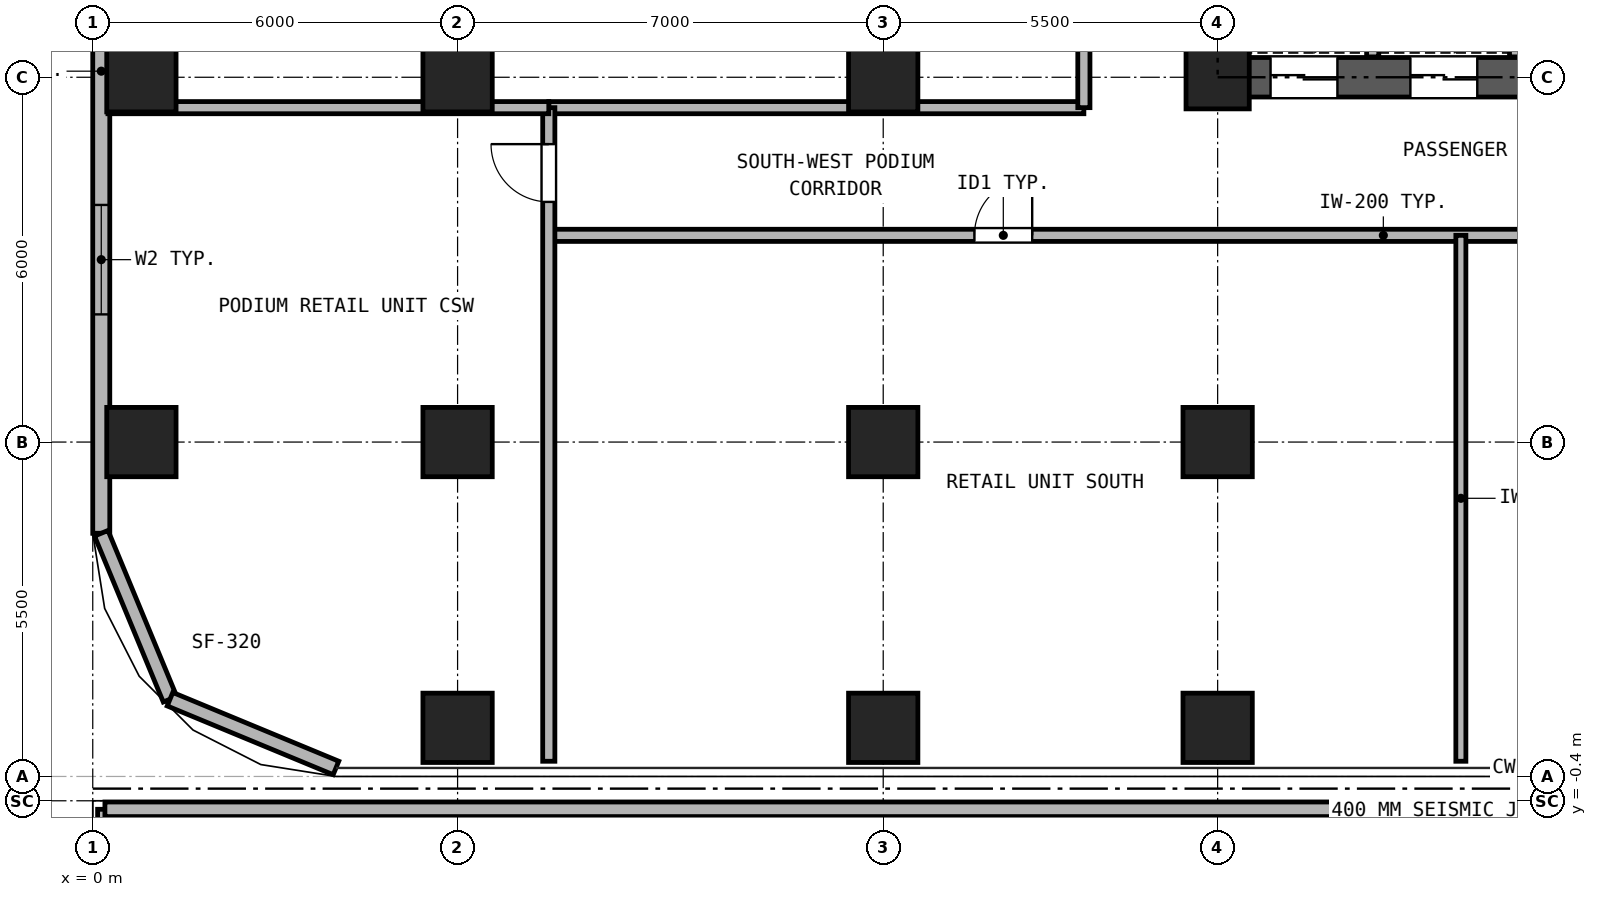
"""IFC4 building model, lengths in metres.
Left out: names, types, materials, properties, quantities, classifications, styles, units other than length and angle.
Written with IfcOpenShell. Run it as: python <this file> out.ifc"""

import sys

from ifc_helpers import new_model, si_unit, direction, frame, frame_2d, origin, origin_2d, place, context, subcontext, project, spatial, rectangle, hollow_rectangle, extrude, source, transform, mapped, element, fill, save


model = new_model("IFC4")
c1 = context("Model", 3, precision=1e-05, world=origin(), true_north=direction((0.0, 1.0)))
c2 = subcontext(c1, "Body", "Model", "MODEL_VIEW")
j1 = project(units=[si_unit("LENGTHUNIT", "METRE"), si_unit("PLANEANGLEUNIT", "RADIAN")], contexts=[c1])
p1 = place(None, origin())
s1 = spatial("IfcSite", under=j1, at=p1, CompositionType="ELEMENT")
p2 = place(p1, origin())
s2 = spatial("IfcBuilding", under=s1, at=p2, CompositionType="ELEMENT")
p3 = place(p2, frame((0.0, 0.0, 9.0)))
s3 = spatial("IfcBuildingStorey", under=s2, at=p3, CompositionType="ELEMENT", Elevation=9.0)
m1 = source(origin(), c2, "Body", "SweptSolid", [
    extrude(hollow_rectangle(XDim=1.14, YDim=1.14, WallThickness=0.07, at=origin_2d()), origin(), (0.0, 0.0, 1.0), 4.18),
])
for number, where, z_axis, x_axis in (
    (1, (6.0, 0.8, 0.0), (0.0, 0.0, 1.0), (1.0, 0.0, 0.0)),
    (2, (13.0, 0.8, 0.0), (0.0, 0.0, 1.0), (1.0, 0.0, 0.0)),
    (3, (18.5, 0.8, 0.0), (0.0, 0.0, 1.0), (1.0, 0.0, 0.0)),
    (4, (0.8, 5.5, 0.0), (0.0, 0.0, 1.0), (1.0, 0.0, 0.0)),
    (5, (0.8, 11.5, 0.0), (0.0, 0.0, 1.0), (1.0, 0.0, 0.0)),
    (6, (6.0, 5.5, 0.0), (0.0, 0.0, 1.0), (1.0, 0.0, 0.0)),
    (7, (6.0, 11.5, 0.0), (0.0, 0.0, 1.0), (1.0, 0.0, 0.0)),
    (8, (13.0, 5.5, 0.0), (0.0, 0.0, 1.0), (1.0, 0.0, 0.0)),
    (9, (13.0, 11.5, 0.0), (0.0, 0.0, 1.0), (1.0, 0.0, 0.0)),
    (10, (18.5, 5.5, 0.0), (0.0, 0.0, 1.0), (1.0, 0.0, 0.0)),
):
    element("IfcColumn", number, at=place(p3, frame(where, z_axis=z_axis, x_axis=x_axis)), inside=s3, PredefinedType="COLUMN", context=c2, shape_type="MappedRepresentation", body=[
        mapped(m1, transform((0.0, 0.0, 0.0), x_axis=(1.0, 0.0, 0.0), y_axis=(0.0, 1.0, 0.0), z_axis=(0.0, 0.0, 1.0), scale=1.0)),
    ])
m2 = source(origin(), c2, "Body", "SweptSolid", [
    extrude(hollow_rectangle(XDim=1.04, YDim=1.04, WallThickness=0.065, at=origin_2d()), origin(), (0.0, 0.0, 1.0), 4.18),
])
p4 = place(p3, frame((18.5, 11.5, 0.0), z_axis=(0.0, 0.0, 1.0), x_axis=(1.0, 0.0, 0.0)))
e11 = element("IfcColumn", 11, at=p4, inside=s3, PredefinedType="COLUMN", context=c2, shape_type="MappedRepresentation", body=[
    mapped(m2, transform((0.0, 0.0, 0.0), x_axis=(1.0, 0.0, 0.0), y_axis=(0.0, 1.0, 0.0), z_axis=(0.0, 0.0, 1.0), scale=1.0)),
])
p5 = place(p3, frame((0.14, 4.0, 0.0), z_axis=(0.0, 0.0, 1.0), x_axis=(0.0, 1.0, 0.0)))
e12 = element("IfcWall", 12, at=p5, inside=s3, PredefinedType="SOLIDWALL", context=c2, shape_type="SweptSolid", body=[
    extrude(rectangle(XDim=32.5, YDim=0.28, at=frame_2d((16.25, 0.0))), origin(), (0.0, 0.0, 1.0), 4.18),
])
p6 = place(p5, frame((3.6, 0.0, 0.9)))
e13 = element("IfcOpeningElement", 13, at=p6, cuts=e12, PredefinedType="OPENING", context=c2, shape_type="SweptSolid", body=[
    extrude(rectangle(XDim=1.8, YDim=2.1, at=frame_2d((0.9, 1.05))), frame((0.0, 0.15, 0.0), z_axis=(0.0, -1.0, 0.0), x_axis=(1.0, 0.0, 0.0)), (0.0, 0.0, 1.0), 0.3),
])
p7 = place(p5, frame((9.8, 0.0, 0.9)))
e14 = element("IfcOpeningElement", 14, at=p7, cuts=e12, PredefinedType="OPENING", context=c2, shape_type="SweptSolid", body=[
    extrude(rectangle(XDim=1.8, YDim=2.1, at=frame_2d((0.9, 1.05))), frame((0.0, 0.15, 0.0), z_axis=(0.0, -1.0, 0.0), x_axis=(1.0, 0.0, 0.0)), (0.0, 0.0, 1.0), 0.3),
])
p8 = place(p5, frame((15.8, 0.0, 0.9)))
e15 = element("IfcOpeningElement", 15, at=p8, cuts=e12, PredefinedType="OPENING", context=c2, shape_type="SweptSolid", body=[
    extrude(rectangle(XDim=1.8, YDim=2.1, at=frame_2d((0.9, 1.05))), frame((0.0, 0.15, 0.0), z_axis=(0.0, -1.0, 0.0), x_axis=(1.0, 0.0, 0.0)), (0.0, 0.0, 1.0), 0.3),
])
p9 = place(p5, frame((21.6, 0.0, 0.9)))
e16 = element("IfcOpeningElement", 16, at=p9, cuts=e12, PredefinedType="OPENING", context=c2, shape_type="SweptSolid", body=[
    extrude(rectangle(XDim=1.8, YDim=2.1, at=frame_2d((0.9, 1.05))), frame((0.0, 0.15, 0.0), z_axis=(0.0, -1.0, 0.0), x_axis=(1.0, 0.0, 0.0)), (0.0, 0.0, 1.0), 0.3),
])
p10 = place(p5, frame((27.6, 0.0, 0.9)))
e17 = element("IfcOpeningElement", 17, at=p10, cuts=e12, PredefinedType="OPENING", context=c2, shape_type="SweptSolid", body=[
    extrude(rectangle(XDim=1.8, YDim=2.1, at=frame_2d((0.9, 1.05))), frame((0.0, 0.15, 0.0), z_axis=(0.0, -1.0, 0.0), x_axis=(1.0, 0.0, 0.0)), (0.0, 0.0, 1.0), 0.3),
])
for number, where, z_axis, x_axis in (
    (18, (0.14, 4.0, 0.0), (0.0, 0.0, 1.0), (0.383, -0.924, 0.0)),
    (19, (1.271, 1.271, 0.0), (0.0, 0.0, 1.0), (0.924, -0.383, 0.0)),
):
    element("IfcWall", number, at=place(p3, frame(where, z_axis=z_axis, x_axis=x_axis)), inside=s3, PredefinedType="SOLIDWALL", context=c2, shape_type="SweptSolid", body=[
        extrude(rectangle(XDim=2.954, YDim=0.24, at=frame_2d((1.477, 0.0))), origin(), (0.0, 0.0, 1.0), 4.18),
    ])
p11 = place(p3, frame((0.2, -10.95, 0.0), z_axis=(0.0, 0.0, 1.0), x_axis=(0.0, 1.0, 0.0)))
e20 = element("IfcWall", 20, at=p11, inside=s3, PredefinedType="SOLIDWALL", context=c2, shape_type="SweptSolid", body=[
    extrude(rectangle(XDim=10.41, YDim=0.24, at=frame_2d((5.205, 0.0))), origin(), (0.0, 0.0, 1.0), 4.18),
])
p12 = place(p3, frame((0.2, -0.54, 0.0), z_axis=(0.0, 0.0, 1.0), x_axis=(1.0, 0.0, 0.0)))
e21 = element("IfcWall", 21, at=p12, inside=s3, PredefinedType="SOLIDWALL", context=c2, shape_type="SweptSolid", body=[
    extrude(rectangle(XDim=47.34, YDim=0.24, at=frame_2d((23.67, 0.0))), origin(), (0.0, 0.0, 1.0), 4.18),
])
p13 = place(p3, frame((18.175, 11.5, 0.0), z_axis=(0.0, 0.0, 1.0), x_axis=(1.0, 0.0, 0.0)))
e22 = element("IfcWall", 22, at=p13, inside=s3, PredefinedType="SHEAR", context=c2, shape_type="SweptSolid", body=[
    extrude(rectangle(XDim=10.65, YDim=0.65, at=frame_2d((5.325, 0.0))), origin(), (0.0, 0.0, 1.0), 4.18),
])
p14 = place(p13, frame((1.195, 0.0, 0.0)))
e23 = element("IfcOpeningElement", 23, at=p14, cuts=e22, PredefinedType="OPENING", context=c2, shape_type="SweptSolid", body=[
    extrude(rectangle(XDim=1.1, YDim=2.25, at=frame_2d((0.55, 1.125))), frame((0.0, 0.335, 0.0), z_axis=(0.0, -1.0, 0.0), x_axis=(1.0, 0.0, 0.0)), (0.0, 0.0, 1.0), 0.67),
])
p15 = place(p13, frame((3.495, 0.0, 0.0)))
e24 = element("IfcOpeningElement", 24, at=p15, cuts=e22, PredefinedType="OPENING", context=c2, shape_type="SweptSolid", body=[
    extrude(rectangle(XDim=1.1, YDim=2.25, at=frame_2d((0.55, 1.125))), frame((0.0, 0.335, 0.0), z_axis=(0.0, -1.0, 0.0), x_axis=(1.0, 0.0, 0.0)), (0.0, 0.0, 1.0), 0.67),
])
p16 = place(p13, frame((5.925, 0.0, 0.0)))
e25 = element("IfcOpeningElement", 25, at=p16, cuts=e22, PredefinedType="OPENING", context=c2, shape_type="SweptSolid", body=[
    extrude(rectangle(XDim=1.1, YDim=2.25, at=frame_2d((0.55, 1.125))), frame((0.0, 0.335, 0.0), z_axis=(0.0, -1.0, 0.0), x_axis=(1.0, 0.0, 0.0)), (0.0, 0.0, 1.0), 0.67),
])
p17 = place(p13, frame((8.325, 0.0, 0.0)))
e26 = element("IfcOpeningElement", 26, at=p17, cuts=e22, PredefinedType="OPENING", context=c2, shape_type="SweptSolid", body=[
    extrude(rectangle(XDim=1.1, YDim=2.25, at=frame_2d((0.55, 1.125))), frame((0.0, 0.335, 0.0), z_axis=(0.0, -1.0, 0.0), x_axis=(1.0, 0.0, 0.0)), (0.0, 0.0, 1.0), 0.67),
])
p18 = place(p3, frame((18.5, 11.825, 0.0), z_axis=(0.0, 0.0, 1.0), x_axis=(0.0, 1.0, 0.0)))
e27 = element("IfcWall", 27, at=p18, inside=s3, PredefinedType="SHEAR", context=c2, shape_type="SweptSolid", body=[
    extrude(rectangle(XDim=16.6, YDim=0.65, at=frame_2d((8.3, 0.0))), origin(), (0.0, 0.0, 1.0), 4.18),
])
p19 = place(p18, frame((7.325, 0.0, 0.0)))
e28 = element("IfcOpeningElement", 28, at=p19, cuts=e27, PredefinedType="OPENING", context=c2, shape_type="SweptSolid", body=[
    extrude(rectangle(XDim=1.15, YDim=2.2, at=frame_2d((0.575, 1.1))), frame((0.0, 0.335, 0.0), z_axis=(0.0, -1.0, 0.0), x_axis=(1.0, 0.0, 0.0)), (0.0, 0.0, 1.0), 0.67),
])
for number, where, z_axis, x_axis in (
    (29, (21.05, 11.835, 0.0), (0.0, 0.0, 1.0), (0.0, 1.0, 0.0)),
    (30, (23.4, 11.835, 0.0), (0.0, 0.0, 1.0), (0.0, 1.0, 0.0)),
):
    element("IfcWall", number, at=place(p3, frame(where, z_axis=z_axis, x_axis=x_axis)), inside=s3, PredefinedType="PARTITIONING", context=c2, shape_type="SweptSolid", body=[
        extrude(rectangle(XDim=3.165, YDim=0.2, at=frame_2d((1.583, 0.0))), origin(), (0.0, 0.0, 1.0), 4.18),
    ])
p20 = place(p3, frame((7.5, 8.9, 0.0), z_axis=(0.0, 0.0, 1.0), x_axis=(1.0, 0.0, 0.0)))
e31 = element("IfcWall", 31, at=p20, inside=s3, PredefinedType="PARTITIONING", context=c2, shape_type="SweptSolid", body=[
    extrude(rectangle(XDim=32.0, YDim=0.2, at=frame_2d((16.0, 0.0))), origin(), (0.0, 0.0, 1.0), 4.18),
])
p21 = place(p20, frame((7.0, 0.0, 0.0)))
e32 = element("IfcOpeningElement", 32, at=p21, cuts=e31, PredefinedType="OPENING", context=c2, shape_type="SweptSolid", body=[
    extrude(rectangle(XDim=0.95, YDim=2.15, at=frame_2d((0.475, 1.075))), frame((0.0, 0.11, 0.0), z_axis=(0.0, -1.0, 0.0), x_axis=(1.0, 0.0, 0.0)), (0.0, 0.0, 1.0), 0.22),
])
p22 = place(p20, frame((19.5, 0.0, 0.0)))
e33 = element("IfcOpeningElement", 33, at=p22, cuts=e31, PredefinedType="OPENING", context=c2, shape_type="SweptSolid", body=[
    extrude(rectangle(XDim=0.95, YDim=2.15, at=frame_2d((0.475, 1.075))), frame((0.0, 0.11, 0.0), z_axis=(0.0, -1.0, 0.0), x_axis=(1.0, 0.0, 0.0)), (0.0, 0.0, 1.0), 0.22),
])
p23 = place(p20, frame((26.35, 0.0, 0.0)))
e34 = element("IfcOpeningElement", 34, at=p23, cuts=e31, PredefinedType="OPENING", context=c2, shape_type="SweptSolid", body=[
    extrude(rectangle(XDim=0.92, YDim=2.1, at=frame_2d((0.46, 1.05))), frame((0.0, 0.11, 0.0), z_axis=(0.0, -1.0, 0.0), x_axis=(1.0, 0.0, 0.0)), (0.0, 0.0, 1.0), 0.22),
])
p24 = place(p20, frame((29.85, 0.0, 0.0)))
e35 = element("IfcOpeningElement", 35, at=p24, cuts=e31, PredefinedType="OPENING", context=c2, shape_type="SweptSolid", body=[
    extrude(rectangle(XDim=0.92, YDim=2.1, at=frame_2d((0.46, 1.05))), frame((0.0, 0.11, 0.0), z_axis=(0.0, -1.0, 0.0), x_axis=(1.0, 0.0, 0.0)), (0.0, 0.0, 1.0), 0.22),
])
p25 = place(p3, frame((7.5, 11.0, 0.0), z_axis=(0.0, 0.0, 1.0), x_axis=(1.0, 0.0, 0.0)))
e36 = element("IfcWall", 36, at=p25, inside=s3, PredefinedType="PARTITIONING", context=c2, shape_type="SweptSolid", body=[
    extrude(rectangle(XDim=8.8, YDim=0.2, at=frame_2d((4.4, 0.0))), origin(), (0.0, 0.0, 1.0), 4.18),
])
p26 = place(p3, frame((16.3, 11.0, 0.0), z_axis=(0.0, 0.0, 1.0), x_axis=(0.0, 1.0, 0.0)))
e37 = element("IfcWall", 37, at=p26, inside=s3, PredefinedType="PARTITIONING", context=c2, shape_type="SweptSolid", body=[
    extrude(rectangle(XDim=18.25, YDim=0.2, at=frame_2d((9.125, 0.0))), origin(), (0.0, 0.0, 1.0), 4.18),
])
p27 = place(p26, frame((4.25, 0.0, 0.0)))
e38 = element("IfcOpeningElement", 38, at=p27, cuts=e37, PredefinedType="OPENING", context=c2, shape_type="SweptSolid", body=[
    extrude(rectangle(XDim=0.95, YDim=2.15, at=frame_2d((0.475, 1.075))), frame((0.0, 0.11, 0.0), z_axis=(0.0, -1.0, 0.0), x_axis=(1.0, 0.0, 0.0)), (0.0, 0.0, 1.0), 0.22),
])
p28 = place(p26, frame((13.375, 0.0, 0.0)))
e39 = element("IfcOpeningElement", 39, at=p28, cuts=e37, PredefinedType="OPENING", context=c2, shape_type="SweptSolid", body=[
    extrude(rectangle(XDim=0.95, YDim=2.15, at=frame_2d((0.475, 1.075))), frame((0.0, 0.11, 0.0), z_axis=(0.0, -1.0, 0.0), x_axis=(1.0, 0.0, 0.0)), (0.0, 0.0, 1.0), 0.22),
])
p29 = place(p3, frame((7.5, 0.25, 0.0), z_axis=(0.0, 0.0, 1.0), x_axis=(0.0, 1.0, 0.0)))
e40 = element("IfcWall", 40, at=p29, inside=s3, PredefinedType="PARTITIONING", context=c2, shape_type="SweptSolid", body=[
    extrude(rectangle(XDim=10.75, YDim=0.2, at=frame_2d((5.375, 0.0))), origin(), (0.0, 0.0, 1.0), 4.18),
])
p30 = place(p29, frame((9.2, 0.0, 0.0)))
e41 = element("IfcOpeningElement", 41, at=p30, cuts=e40, PredefinedType="OPENING", context=c2, shape_type="SweptSolid", body=[
    extrude(rectangle(XDim=0.95, YDim=2.15, at=frame_2d((0.475, 1.075))), frame((0.0, 0.11, 0.0), z_axis=(0.0, -1.0, 0.0), x_axis=(1.0, 0.0, 0.0)), (0.0, 0.0, 1.0), 0.22),
])
p31 = place(p3, frame((0.25, 11.0, 0.0), z_axis=(0.0, 0.0, 1.0), x_axis=(1.0, 0.0, 0.0)))
e42 = element("IfcWall", 42, at=p31, inside=s3, PredefinedType="PARTITIONING", context=c2, shape_type="SweptSolid", body=[
    extrude(rectangle(XDim=7.25, YDim=0.2, at=frame_2d((3.625, 0.0))), origin(), (0.0, 0.0, 1.0), 4.18),
])
p32 = place(p3, frame((22.5, 0.25, 0.0), z_axis=(0.0, 0.0, 1.0), x_axis=(0.0, 1.0, 0.0)))
e43 = element("IfcWall", 43, at=p32, inside=s3, PredefinedType="PARTITIONING", context=c2, shape_type="SweptSolid", body=[
    extrude(rectangle(XDim=8.65, YDim=0.165, at=frame_2d((4.325, 0.0))), origin(), (0.0, 0.0, 1.0), 4.18),
])
p33 = place(p6, origin())
e44 = element("IfcWindow", 44, at=p33, inside=s3, PartitioningType="SINGLE_PANEL", PredefinedType="WINDOW", context=c2, shape_type="SweptSolid", body=[
    extrude(rectangle(XDim=1.8, YDim=2.1, at=frame_2d((0.9, 1.05))), frame((0.0, 0.03, 0.0), z_axis=(0.0, -1.0, 0.0), x_axis=(1.0, 0.0, 0.0)), (0.0, 0.0, 1.0), 0.06),
])
fill(e13, e44)
p34 = place(p14, frame((1.1, 0.0, 0.0), z_axis=(0.0, 0.0, 1.0), x_axis=(-1.0, 0.0, 0.0)))
e45 = element("IfcDoor", 45, at=p34, inside=s3, OperationType="DOUBLE_DOOR_SLIDING", PredefinedType="DOOR", context=c2, shape_type="SweptSolid", body=[
    extrude(rectangle(XDim=1.1, YDim=2.25, at=frame_2d((0.55, 1.125))), frame((0.0, 0.025, 0.0), z_axis=(0.0, -1.0, 0.0), x_axis=(1.0, 0.0, 0.0)), (0.0, 0.0, 1.0), 0.05),
])
fill(e23, e45)
p35 = place(p15, frame((1.1, 0.0, 0.0), z_axis=(0.0, 0.0, 1.0), x_axis=(-1.0, 0.0, 0.0)))
e46 = element("IfcDoor", 46, at=p35, inside=s3, OperationType="DOUBLE_DOOR_SLIDING", PredefinedType="DOOR", context=c2, shape_type="SweptSolid", body=[
    extrude(rectangle(XDim=1.1, YDim=2.25, at=frame_2d((0.55, 1.125))), frame((0.0, 0.025, 0.0), z_axis=(0.0, -1.0, 0.0), x_axis=(1.0, 0.0, 0.0)), (0.0, 0.0, 1.0), 0.05),
])
fill(e24, e46)
p36 = place(p21, frame((0.95, 0.0, 0.0), z_axis=(0.0, 0.0, 1.0), x_axis=(-1.0, 0.0, 0.0)))
e47 = element("IfcDoor", 47, at=p36, inside=s3, OperationType="SINGLE_SWING_RIGHT", PredefinedType="DOOR", context=c2, shape_type="SweptSolid", body=[
    extrude(rectangle(XDim=0.95, YDim=2.15, at=frame_2d((0.475, 1.075))), frame((0.0, 0.025, 0.0), z_axis=(0.0, -1.0, 0.0), x_axis=(1.0, 0.0, 0.0)), (0.0, 0.0, 1.0), 0.05),
])
fill(e32, e47)
p37 = place(p30, frame((0.95, 0.0, 0.0), z_axis=(0.0, 0.0, 1.0), x_axis=(-1.0, 0.0, 0.0)))
e48 = element("IfcDoor", 48, at=p37, inside=s3, OperationType="SINGLE_SWING_RIGHT", PredefinedType="DOOR", context=c2, shape_type="SweptSolid", body=[
    extrude(rectangle(XDim=0.95, YDim=2.15, at=frame_2d((0.475, 1.075))), frame((0.0, 0.025, 0.0), z_axis=(0.0, -1.0, 0.0), x_axis=(1.0, 0.0, 0.0)), (0.0, 0.0, 1.0), 0.05),
])
fill(e41, e48)
save(model, sys.argv[1])
